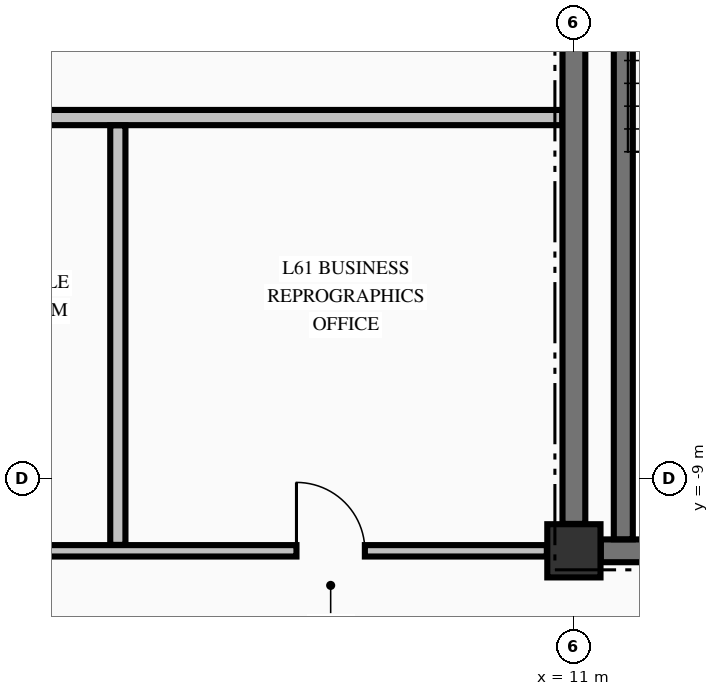
"""IFC4 building model, lengths in metres.
Left out: names, types, materials, properties, quantities, classifications, styles, units other than length and angle.
Written with IfcOpenShell. Run it as: python <this file> out.ifc"""

import sys

from ifc_helpers import new_model, si_unit, direction, frame, frame_2d, origin, origin_2d, place, context, subcontext, project, spatial, rectangle, extrude, element, fill, save


model = new_model("IFC4")
c1 = context("Model", 3, precision=1e-05, world=origin(), true_north=direction((0.0, 1.0)))
c2 = subcontext(c1, "Body", "Model", "MODEL_VIEW")
j1 = project(units=[si_unit("LENGTHUNIT", "METRE"), si_unit("PLANEANGLEUNIT", "RADIAN")], contexts=[c1])
p1 = place(None, origin())
s1 = spatial("IfcSite", under=j1, at=p1, CompositionType="ELEMENT")
p2 = place(p1, origin())
s2 = spatial("IfcBuilding", under=s1, at=p2, CompositionType="ELEMENT")
p3 = place(p2, frame((0.0, 0.0, 233.28)))
s3 = spatial("IfcBuildingStorey", under=s2, at=p3, CompositionType="ELEMENT", Elevation=233.28)
p4 = place(p3, frame((11.0, -9.95, -0.25), z_axis=(0.0, 0.0, 1.0), x_axis=(1.0, 0.0, 0.0)))
e1 = element("IfcColumn", 1, at=p4, inside=s3, PredefinedType="COLUMN", context=c2, shape_type="SweptSolid", body=[
    extrude(rectangle(XDim=0.7, YDim=0.7, at=origin_2d()), origin(), (0.0, 0.0, 1.0), 3.23),
])
p5 = place(p3, frame((11.354, -9.95, 0.0), z_axis=(0.0, 0.0, 1.0), x_axis=(1.0, 0.0, 0.0)))
e2 = element("IfcWall", 2, at=p5, inside=s3, PredefinedType="SHEAR", context=c2, shape_type="SweptSolid", body=[
    extrude(rectangle(XDim=3.346, YDim=0.3, at=frame_2d((1.673, 0.0))), origin(), (0.0, 0.0, 1.0), 2.98),
])
p6 = place(p3, frame((-10.644, -9.95, 0.0), z_axis=(0.0, 0.0, 1.0), x_axis=(1.0, 0.0, 0.0)))
e3 = element("IfcWall", 3, at=p6, inside=s3, PredefinedType="PARTITIONING", context=c2, shape_type="SweptSolid", body=[
    extrude(rectangle(XDim=21.288, YDim=0.15, at=frame_2d((10.644, 0.0))), origin(), (0.0, 0.0, 1.0), 2.98),
])
p7 = place(p6, frame((8.294, 0.0, 0.0)))
e4 = element("IfcOpeningElement", 4, at=p7, cuts=e3, PredefinedType="OPENING", context=c2, shape_type="SweptSolid", body=[
    extrude(rectangle(XDim=1.1, YDim=2.15, at=frame_2d((0.55, 1.075))), frame((0.0, 0.085, 0.0), z_axis=(0.0, -1.0, 0.0), x_axis=(1.0, 0.0, 0.0)), (0.0, 0.0, 1.0), 0.17),
])
p8 = place(p6, frame((13.769, 0.0, 0.0)))
e5 = element("IfcOpeningElement", 5, at=p8, cuts=e3, PredefinedType="OPENING", context=c2, shape_type="SweptSolid", body=[
    extrude(rectangle(XDim=0.95, YDim=2.15, at=frame_2d((0.475, 1.075))), frame((0.0, 0.085, 0.0), z_axis=(0.0, -1.0, 0.0), x_axis=(1.0, 0.0, 0.0)), (0.0, 0.0, 1.0), 0.17),
])
p9 = place(p6, frame((17.994, 0.0, 0.0)))
e6 = element("IfcOpeningElement", 6, at=p9, cuts=e3, PredefinedType="OPENING", context=c2, shape_type="SweptSolid", body=[
    extrude(rectangle(XDim=0.9, YDim=2.15, at=frame_2d((0.45, 1.075))), frame((0.0, 0.085, 0.0), z_axis=(0.0, -1.0, 0.0), x_axis=(1.0, 0.0, 0.0)), (0.0, 0.0, 1.0), 0.17),
])
p10 = place(p3, frame((-0.775, -4.25, 0.0), z_axis=(0.0, 0.0, 1.0), x_axis=(1.0, 0.0, 0.0)))
e7 = element("IfcWall", 7, at=p10, inside=s3, PredefinedType="PARTITIONING", context=c2, shape_type="SweptSolid", body=[
    extrude(rectangle(XDim=11.622, YDim=0.2, at=frame_2d((5.811, 0.0))), origin(), (0.0, 0.0, 1.0), 2.98),
])
p11 = place(p3, frame((11.0, -9.596, 0.0), z_axis=(0.0, 0.0, 1.0), x_axis=(0.0, 1.0, 0.0)))
e8 = element("IfcWall", 8, at=p11, inside=s3, PredefinedType="SHEAR", context=c2, shape_type="SweptSolid", body=[
    extrude(rectangle(XDim=9.242, YDim=0.3, at=frame_2d((4.621, 0.0))), origin(), (0.0, 0.0, 1.0), 2.98),
])
p12 = place(p3, frame((11.65, -9.798, 0.0), z_axis=(0.0, 0.0, 1.0), x_axis=(0.0, 1.0, 0.0)))
e9 = element("IfcWall", 9, at=p12, inside=s3, PredefinedType="SOLIDWALL", context=c2, shape_type="SweptSolid", body=[
    extrude(rectangle(XDim=9.396, YDim=0.25, at=frame_2d((4.698, 0.0))), origin(), (0.0, 0.0, 1.0), 2.98),
])
p13 = place(p3, frame((5.0, -9.872, 0.0), z_axis=(0.0, 0.0, 1.0), x_axis=(0.0, 1.0, 0.0)))
e10 = element("IfcWall", 10, at=p13, inside=s3, PredefinedType="PARTITIONING", context=c2, shape_type="SweptSolid", body=[
    extrude(rectangle(XDim=5.519, YDim=0.2, at=frame_2d((2.76, 0.0))), origin(), (0.0, 0.0, 1.0), 2.98),
])
p14 = place(p9, origin())
e11 = element("IfcDoor", 11, at=p14, inside=s3, OperationType="SINGLE_SWING_LEFT", PredefinedType="DOOR", context=c2, shape_type="SweptSolid", body=[
    extrude(rectangle(XDim=0.9, YDim=2.15, at=frame_2d((0.45, 1.075))), frame((0.0, 0.025, 0.0), z_axis=(0.0, -1.0, 0.0), x_axis=(1.0, 0.0, 0.0)), (0.0, 0.0, 1.0), 0.05),
])
fill(e6, e11)
save(model, sys.argv[1])
